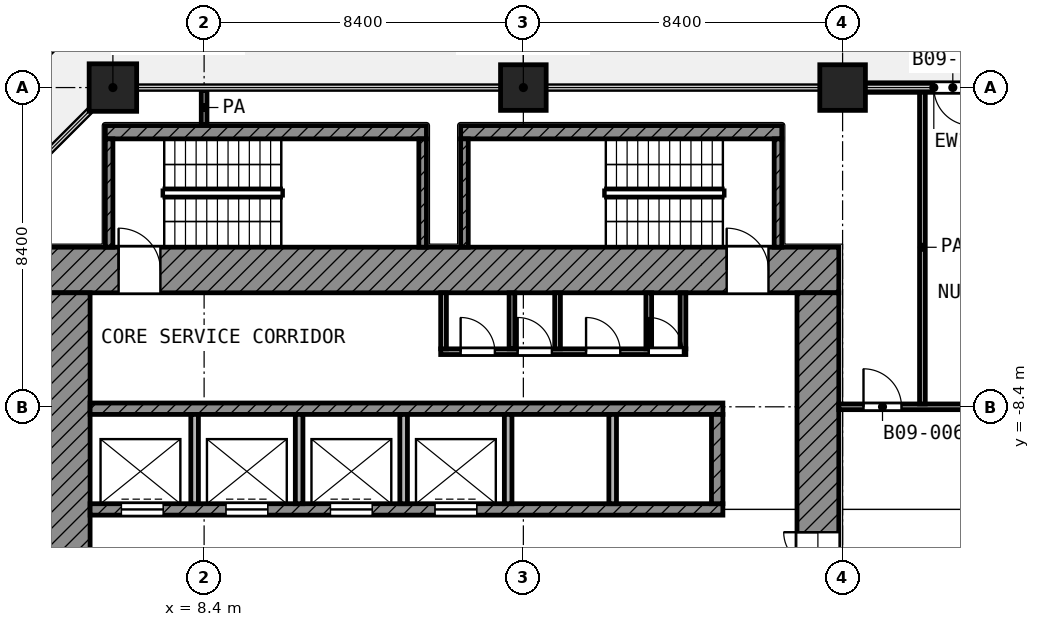
"""IFC4 building model, lengths in metres.
Left out: names, types, materials, properties, quantities, classifications, styles, units other than length and angle.
Written with IfcOpenShell. Run it as: python <this file> out.ifc"""

import sys

from ifc_helpers import new_model, si_unit, direction, frame, frame_2d, origin, origin_2d, place, context, subcontext, project, spatial, rectangle, extrude, element, fill, save


model = new_model("IFC4")
c1 = context("Model", 3, precision=1e-05, world=origin(), true_north=direction((0.0, 1.0)))
c2 = subcontext(c1, "Body", "Model", "MODEL_VIEW")
j1 = project(units=[si_unit("LENGTHUNIT", "METRE"), si_unit("PLANEANGLEUNIT", "RADIAN")], contexts=[c1])
p1 = place(None, origin())
s1 = spatial("IfcSite", under=j1, at=p1, CompositionType="ELEMENT")
p2 = place(p1, origin())
s2 = spatial("IfcBuilding", under=s1, at=p2, CompositionType="ELEMENT")
p3 = place(p2, frame((0.0, 0.0, 43.4)))
s3 = spatial("IfcBuildingStorey", under=s2, at=p3, CompositionType="ELEMENT", Elevation=43.4)
p4 = place(p3, frame((6.0, 0.0, 0.0), z_axis=(0.0, 0.0, 1.0), x_axis=(1.0, 0.0, 0.0)))
e1 = element("IfcColumn", 1, at=p4, inside=s3, PredefinedType="COLUMN", context=c2, shape_type="SweptSolid", body=[
    extrude(rectangle(XDim=1.25, YDim=1.25, at=origin_2d()), origin(), (0.0, 0.0, 1.0), 4.2),
])
for number, where, z_axis, x_axis in (
    (2, (16.8, 0.0, 0.0), (0.0, 0.0, 1.0), (1.0, 0.0, 0.0)),
    (3, (25.2, 0.0, 0.0), (0.0, 0.0, 1.0), (1.0, 0.0, 0.0)),
):
    element("IfcColumn", number, at=place(p3, frame(where, z_axis=z_axis, x_axis=x_axis)), inside=s3, PredefinedType="COLUMN", context=c2, shape_type="SweptSolid", body=[
        extrude(rectangle(XDim=1.2, YDim=1.2, at=origin_2d()), origin(), (0.0, 0.0, 1.0), 4.2),
    ])
p5 = place(p3, frame((29.4, 0.0, 0.0), z_axis=(0.0, 0.0, 1.0), x_axis=(-1.0, 0.0, 0.0)))
e4 = element("IfcWall", 4, at=p5, inside=s3, PredefinedType="SOLIDWALL", context=c2, shape_type="SweptSolid", body=[
    extrude(rectangle(XDim=3.6, YDim=0.25, at=frame_2d((1.8, 0.0))), origin(), (0.0, 0.0, 1.0), 3.78),
])
p6 = place(p5, frame((0.8, 0.0, 0.0)))
e5 = element("IfcOpeningElement", 5, at=p6, cuts=e4, PredefinedType="OPENING", context=c2, shape_type="SweptSolid", body=[
    extrude(rectangle(XDim=1.0, YDim=2.1, at=frame_2d((0.5, 1.05))), frame((0.0, 0.135, 0.0), z_axis=(0.0, -1.0, 0.0), x_axis=(1.0, 0.0, 0.0)), (0.0, 0.0, 1.0), 0.27),
])
p7 = place(p3, frame((4.2, -4.8, 0.0), z_axis=(0.0, 0.0, 1.0), x_axis=(1.0, 0.0, 0.0)))
e6 = element("IfcWall", 6, at=p7, inside=s3, PredefinedType="SHEAR", context=c2, shape_type="SweptSolid", body=[
    extrude(rectangle(XDim=20.9, YDim=1.2, at=frame_2d((10.45, 0.0))), origin(), (0.0, 0.0, 1.0), 3.9),
])
p8 = place(p7, frame((1.95, 0.0, 0.0)))
e7 = element("IfcOpeningElement", 7, at=p8, cuts=e6, PredefinedType="OPENING", context=c2, shape_type="SweptSolid", body=[
    extrude(rectangle(XDim=1.1, YDim=2.1, at=frame_2d((0.55, 1.05))), frame((0.0, 0.61, 0.0), z_axis=(0.0, -1.0, 0.0), x_axis=(1.0, 0.0, 0.0)), (0.0, 0.0, 1.0), 1.22),
])
p9 = place(p7, frame((17.95, 0.0, 0.0)))
e8 = element("IfcOpeningElement", 8, at=p9, cuts=e6, PredefinedType="OPENING", context=c2, shape_type="SweptSolid", body=[
    extrude(rectangle(XDim=1.1, YDim=2.1, at=frame_2d((0.55, 1.05))), frame((0.0, 0.61, 0.0), z_axis=(0.0, -1.0, 0.0), x_axis=(1.0, 0.0, 0.0)), (0.0, 0.0, 1.0), 1.22),
])
p10 = place(p3, frame((4.8, -25.1, 0.0), z_axis=(0.0, 0.0, 1.0), x_axis=(0.0, 1.0, 0.0)))
e9 = element("IfcWall", 9, at=p10, inside=s3, PredefinedType="SHEAR", context=c2, shape_type="SweptSolid", body=[
    extrude(rectangle(XDim=19.7, YDim=1.2, at=frame_2d((9.85, 0.0))), origin(), (0.0, 0.0, 1.0), 3.9),
])
p11 = place(p10, frame((11.55, 0.0, 0.0)))
e10 = element("IfcOpeningElement", 10, at=p11, cuts=e9, PredefinedType="OPENING", context=c2, shape_type="SweptSolid", body=[
    extrude(rectangle(XDim=1.1, YDim=2.1, at=frame_2d((0.55, 1.05))), frame((0.0, 0.61, 0.0), z_axis=(0.0, -1.0, 0.0), x_axis=(1.0, 0.0, 0.0)), (0.0, 0.0, 1.0), 1.22),
])
p12 = place(p10, frame((2.25, 0.0, 0.0)))
e11 = element("IfcOpeningElement", 11, at=p12, cuts=e9, PredefinedType="OPENING", context=c2, shape_type="SweptSolid", body=[
    extrude(rectangle(XDim=1.1, YDim=2.1, at=frame_2d((0.55, 1.05))), frame((0.0, 0.61, 0.0), z_axis=(0.0, -1.0, 0.0), x_axis=(1.0, 0.0, 0.0)), (0.0, 0.0, 1.0), 1.22),
])
p13 = place(p3, frame((24.55, -24.0, 0.0), z_axis=(0.0, 0.0, 1.0), x_axis=(0.0, 1.0, 0.0)))
e12 = element("IfcWall", 12, at=p13, inside=s3, PredefinedType="SHEAR", context=c2, shape_type="SweptSolid", body=[
    extrude(rectangle(XDim=18.6, YDim=1.1, at=frame_2d((9.3, 0.0))), origin(), (0.0, 0.0, 1.0), 3.9),
])
p14 = place(p13, frame((10.5, 0.0, 0.0)))
e13 = element("IfcOpeningElement", 13, at=p14, cuts=e12, PredefinedType="OPENING", context=c2, shape_type="SweptSolid", body=[
    extrude(rectangle(XDim=1.8, YDim=2.1, at=frame_2d((0.9, 1.05))), frame((0.0, 0.56, 0.0), z_axis=(0.0, -1.0, 0.0), x_axis=(1.0, 0.0, 0.0)), (0.0, 0.0, 1.0), 1.12),
])
p15 = place(p3, frame((5.4, -8.45, 0.0), z_axis=(0.0, 0.0, 1.0), x_axis=(1.0, 0.0, 0.0)))
e14 = element("IfcWall", 14, at=p15, inside=s3, PredefinedType="SHEAR", context=c2, shape_type="SweptSolid", body=[
    extrude(rectangle(XDim=16.65, YDim=0.3, at=frame_2d((8.325, 0.0))), origin(), (0.0, 0.0, 1.0), 3.9),
])
p16 = place(p3, frame((5.4, -11.1, 0.0), z_axis=(0.0, 0.0, 1.0), x_axis=(1.0, 0.0, 0.0)))
e15 = element("IfcWall", 15, at=p16, inside=s3, PredefinedType="SHEAR", context=c2, shape_type="SweptSolid", body=[
    extrude(rectangle(XDim=16.65, YDim=0.3, at=frame_2d((8.325, 0.0))), origin(), (0.0, 0.0, 1.0), 3.9),
])
p17 = place(p16, frame((0.825, 0.0, 0.0)))
e16 = element("IfcOpeningElement", 16, at=p17, cuts=e15, PredefinedType="OPENING", context=c2, shape_type="SweptSolid", body=[
    extrude(rectangle(XDim=1.1, YDim=2.1, at=frame_2d((0.55, 1.05))), frame((0.0, 0.16, 0.0), z_axis=(0.0, -1.0, 0.0), x_axis=(1.0, 0.0, 0.0)), (0.0, 0.0, 1.0), 0.32),
])
p18 = place(p16, frame((3.575, 0.0, 0.0)))
e17 = element("IfcOpeningElement", 17, at=p18, cuts=e15, PredefinedType="OPENING", context=c2, shape_type="SweptSolid", body=[
    extrude(rectangle(XDim=1.1, YDim=2.1, at=frame_2d((0.55, 1.05))), frame((0.0, 0.16, 0.0), z_axis=(0.0, -1.0, 0.0), x_axis=(1.0, 0.0, 0.0)), (0.0, 0.0, 1.0), 0.32),
])
p19 = place(p16, frame((6.325, 0.0, 0.0)))
e18 = element("IfcOpeningElement", 18, at=p19, cuts=e15, PredefinedType="OPENING", context=c2, shape_type="SweptSolid", body=[
    extrude(rectangle(XDim=1.1, YDim=2.1, at=frame_2d((0.55, 1.05))), frame((0.0, 0.16, 0.0), z_axis=(0.0, -1.0, 0.0), x_axis=(1.0, 0.0, 0.0)), (0.0, 0.0, 1.0), 0.32),
])
p20 = place(p16, frame((9.075, 0.0, 0.0)))
e19 = element("IfcOpeningElement", 19, at=p20, cuts=e15, PredefinedType="OPENING", context=c2, shape_type="SweptSolid", body=[
    extrude(rectangle(XDim=1.1, YDim=2.1, at=frame_2d((0.55, 1.05))), frame((0.0, 0.16, 0.0), z_axis=(0.0, -1.0, 0.0), x_axis=(1.0, 0.0, 0.0)), (0.0, 0.0, 1.0), 0.32),
])
p21 = place(p3, frame((21.9, -10.95, 0.0), z_axis=(0.0, 0.0, 1.0), x_axis=(0.0, 1.0, 0.0)))
e20 = element("IfcWall", 20, at=p21, inside=s3, PredefinedType="SHEAR", context=c2, shape_type="SweptSolid", body=[
    extrude(rectangle(XDim=2.35, YDim=0.3, at=frame_2d((1.175, 0.0))), origin(), (0.0, 0.0, 1.0), 3.9),
])
for number, where, z_axis, x_axis in (
    (21, (8.15, -10.95, 0.0), (0.0, 0.0, 1.0), (0.0, 1.0, 0.0)),
    (22, (10.9, -10.95, 0.0), (0.0, 0.0, 1.0), (0.0, 1.0, 0.0)),
    (23, (13.65, -10.95, 0.0), (0.0, 0.0, 1.0), (0.0, 1.0, 0.0)),
    (24, (16.4, -10.95, 0.0), (0.0, 0.0, 1.0), (0.0, 1.0, 0.0)),
    (25, (19.15, -10.95, 0.0), (0.0, 0.0, 1.0), (0.0, 1.0, 0.0)),
):
    element("IfcWall", number, at=place(p3, frame(where, z_axis=z_axis, x_axis=x_axis)), inside=s3, PredefinedType="PARTITIONING", context=c2, shape_type="SweptSolid", body=[
        extrude(rectangle(XDim=2.35, YDim=0.2, at=frame_2d((1.175, 0.0))), origin(), (0.0, 0.0, 1.0), 3.9),
    ])
p22 = place(p3, frame((14.625, -6.95, 0.0), z_axis=(0.0, 0.0, 1.0), x_axis=(1.0, 0.0, 0.0)))
e26 = element("IfcWall", 26, at=p22, inside=s3, PredefinedType="PARTITIONING", context=c2, shape_type="SweptSolid", body=[
    extrude(rectangle(XDim=6.45, YDim=0.15, at=frame_2d((3.225, 0.0))), origin(), (0.0, 0.0, 1.0), 3.9),
])
p23 = place(p22, frame((0.525, 0.0, 0.0)))
e27 = element("IfcOpeningElement", 27, at=p23, cuts=e26, PredefinedType="OPENING", context=c2, shape_type="SweptSolid", body=[
    extrude(rectangle(XDim=0.9, YDim=2.1, at=frame_2d((0.45, 1.05))), frame((0.0, 0.085, 0.0), z_axis=(0.0, -1.0, 0.0), x_axis=(1.0, 0.0, 0.0)), (0.0, 0.0, 1.0), 0.17),
])
p24 = place(p22, frame((2.025, 0.0, 0.0)))
e28 = element("IfcOpeningElement", 28, at=p24, cuts=e26, PredefinedType="OPENING", context=c2, shape_type="SweptSolid", body=[
    extrude(rectangle(XDim=0.9, YDim=2.1, at=frame_2d((0.45, 1.05))), frame((0.0, 0.085, 0.0), z_axis=(0.0, -1.0, 0.0), x_axis=(1.0, 0.0, 0.0)), (0.0, 0.0, 1.0), 0.17),
])
p25 = place(p22, frame((3.825, 0.0, 0.0)))
e29 = element("IfcOpeningElement", 29, at=p25, cuts=e26, PredefinedType="OPENING", context=c2, shape_type="SweptSolid", body=[
    extrude(rectangle(XDim=0.9, YDim=2.1, at=frame_2d((0.45, 1.05))), frame((0.0, 0.085, 0.0), z_axis=(0.0, -1.0, 0.0), x_axis=(1.0, 0.0, 0.0)), (0.0, 0.0, 1.0), 0.17),
])
p26 = place(p22, frame((5.475, 0.0, 0.0)))
e30 = element("IfcOpeningElement", 30, at=p26, cuts=e26, PredefinedType="OPENING", context=c2, shape_type="SweptSolid", body=[
    extrude(rectangle(XDim=0.9, YDim=2.1, at=frame_2d((0.45, 1.05))), frame((0.0, 0.085, 0.0), z_axis=(0.0, -1.0, 0.0), x_axis=(1.0, 0.0, 0.0)), (0.0, 0.0, 1.0), 0.17),
])
for number, where, z_axis, x_axis in (
    (31, (14.7, -6.875, 0.0), (0.0, 0.0, 1.0), (0.0, 1.0, 0.0)),
    (32, (16.5, -6.875, 0.0), (0.0, 0.0, 1.0), (0.0, 1.0, 0.0)),
    (33, (17.7, -6.875, 0.0), (0.0, 0.0, 1.0), (0.0, 1.0, 0.0)),
    (34, (20.1, -6.875, 0.0), (0.0, 0.0, 1.0), (0.0, 1.0, 0.0)),
    (35, (21.0, -6.875, 0.0), (0.0, 0.0, 1.0), (0.0, 1.0, 0.0)),
):
    element("IfcWall", number, at=place(p3, frame(where, z_axis=z_axis, x_axis=x_axis)), inside=s3, PredefinedType="PARTITIONING", context=c2, shape_type="SweptSolid", body=[
        extrude(rectangle(XDim=1.475, YDim=0.15, at=frame_2d((0.738, 0.0))), origin(), (0.0, 0.0, 1.0), 3.9),
    ])
p27 = place(p3, frame((5.8, -1.175, 0.0), z_axis=(0.0, 0.0, 1.0), x_axis=(1.0, 0.0, 0.0)))
e36 = element("IfcWall", 36, at=p27, inside=s3, PredefinedType="SHEAR", context=c2, shape_type="SweptSolid", body=[
    extrude(rectangle(XDim=8.45, YDim=0.35, at=frame_2d((4.225, 0.0))), origin(), (0.0, 0.0, 1.0), 3.9),
])
for number, where, z_axis, x_axis in (
    (37, (5.9, -4.2, 0.0), (0.0, 0.0, 1.0), (0.0, 1.0, 0.0)),
    (38, (14.15, -4.2, 0.0), (0.0, 0.0, 1.0), (0.0, 1.0, 0.0)),
):
    element("IfcWall", number, at=place(p3, frame(where, z_axis=z_axis, x_axis=x_axis)), inside=s3, PredefinedType="SHEAR", context=c2, shape_type="SweptSolid", body=[
        extrude(rectangle(XDim=2.85, YDim=0.2, at=frame_2d((1.425, 0.0))), origin(), (0.0, 0.0, 1.0), 3.9),
    ])
p28 = place(p3, frame((15.15, -1.175, 0.0), z_axis=(0.0, 0.0, 1.0), x_axis=(1.0, 0.0, 0.0)))
e39 = element("IfcWall", 39, at=p28, inside=s3, PredefinedType="SHEAR", context=c2, shape_type="SweptSolid", body=[
    extrude(rectangle(XDim=8.45, YDim=0.35, at=frame_2d((4.225, 0.0))), origin(), (0.0, 0.0, 1.0), 3.9),
])
for number, where, z_axis, x_axis in (
    (40, (15.25, -4.2, 0.0), (0.0, 0.0, 1.0), (0.0, 1.0, 0.0)),
    (41, (23.5, -4.2, 0.0), (0.0, 0.0, 1.0), (0.0, 1.0, 0.0)),
):
    element("IfcWall", number, at=place(p3, frame(where, z_axis=z_axis, x_axis=x_axis)), inside=s3, PredefinedType="SHEAR", context=c2, shape_type="SweptSolid", body=[
        extrude(rectangle(XDim=2.85, YDim=0.2, at=frame_2d((1.425, 0.0))), origin(), (0.0, 0.0, 1.0), 3.9),
    ])
p29 = place(p3, frame((25.1, -8.4, 0.0), z_axis=(0.0, 0.0, 1.0), x_axis=(1.0, 0.0, 0.0)))
e42 = element("IfcWall", 42, at=p29, inside=s3, PredefinedType="PARTITIONING", context=c2, shape_type="SweptSolid", body=[
    extrude(rectangle(XDim=14.932, YDim=0.15, at=frame_2d((7.466, 0.0))), origin(), (0.0, 0.0, 1.0), 3.9),
])
p30 = place(p29, frame((0.65, 0.0, 0.0)))
e43 = element("IfcOpeningElement", 43, at=p30, cuts=e42, PredefinedType="OPENING", context=c2, shape_type="SweptSolid", body=[
    extrude(rectangle(XDim=1.0, YDim=2.1, at=frame_2d((0.5, 1.05))), frame((0.0, 0.085, 0.0), z_axis=(0.0, -1.0, 0.0), x_axis=(1.0, 0.0, 0.0)), (0.0, 0.0, 1.0), 0.17),
])
p31 = place(p29, frame((4.75, 0.0, 0.0)))
e44 = element("IfcOpeningElement", 44, at=p31, cuts=e42, PredefinedType="OPENING", context=c2, shape_type="SweptSolid", body=[
    extrude(rectangle(XDim=1.2, YDim=2.1, at=frame_2d((0.6, 1.05))), frame((0.0, 0.085, 0.0), z_axis=(0.0, -1.0, 0.0), x_axis=(1.0, 0.0, 0.0)), (0.0, 0.0, 1.0), 0.17),
])
p32 = place(p3, frame((8.4, -0.97, 0.0), z_axis=(0.0, 0.0, 1.0), x_axis=(0.0, 1.0, 0.0)))
e45 = element("IfcWall", 45, at=p32, inside=s3, PredefinedType="PARTITIONING", context=c2, shape_type="SweptSolid", body=[
    extrude(rectangle(XDim=0.89, YDim=0.15, at=frame_2d((0.445, 0.0))), origin(), (0.0, 0.0, 1.0), 3.9),
])
p33 = place(p3, frame((27.3, -8.325, 0.0), z_axis=(0.0, 0.0, 1.0), x_axis=(0.0, 1.0, 0.0)))
e46 = element("IfcWall", 46, at=p33, inside=s3, PredefinedType="PARTITIONING", context=c2, shape_type="SweptSolid", body=[
    extrude(rectangle(XDim=8.245, YDim=0.15, at=frame_2d((4.123, 0.0))), origin(), (0.0, 0.0, 1.0), 3.9),
])
p34 = place(p6, origin())
e47 = element("IfcDoor", 47, at=p34, inside=s3, OperationType="SINGLE_SWING_LEFT", PredefinedType="DOOR", context=c2, shape_type="SweptSolid", body=[
    extrude(rectangle(XDim=1.0, YDim=2.1, at=frame_2d((0.5, 1.05))), frame((0.0, 0.025, 0.0), z_axis=(0.0, -1.0, 0.0), x_axis=(1.0, 0.0, 0.0)), (0.0, 0.0, 1.0), 0.05),
])
fill(e5, e47)
p35 = place(p17, origin())
e48 = element("IfcDoor", 48, at=p35, inside=s3, OperationType="DOUBLE_DOOR_SLIDING", PredefinedType="DOOR", context=c2, shape_type="SweptSolid", body=[
    extrude(rectangle(XDim=1.1, YDim=2.1, at=frame_2d((0.55, 1.05))), frame((0.0, 0.025, 0.0), z_axis=(0.0, -1.0, 0.0), x_axis=(1.0, 0.0, 0.0)), (0.0, 0.0, 1.0), 0.05),
])
fill(e16, e48)
p36 = place(p18, origin())
e49 = element("IfcDoor", 49, at=p36, inside=s3, OperationType="DOUBLE_DOOR_SLIDING", PredefinedType="DOOR", context=c2, shape_type="SweptSolid", body=[
    extrude(rectangle(XDim=1.1, YDim=2.1, at=frame_2d((0.55, 1.05))), frame((0.0, 0.025, 0.0), z_axis=(0.0, -1.0, 0.0), x_axis=(1.0, 0.0, 0.0)), (0.0, 0.0, 1.0), 0.05),
])
fill(e17, e49)
p37 = place(p19, origin())
e50 = element("IfcDoor", 50, at=p37, inside=s3, OperationType="DOUBLE_DOOR_SLIDING", PredefinedType="DOOR", context=c2, shape_type="SweptSolid", body=[
    extrude(rectangle(XDim=1.1, YDim=2.1, at=frame_2d((0.55, 1.05))), frame((0.0, 0.025, 0.0), z_axis=(0.0, -1.0, 0.0), x_axis=(1.0, 0.0, 0.0)), (0.0, 0.0, 1.0), 0.05),
])
fill(e18, e50)
p38 = place(p20, origin())
e51 = element("IfcDoor", 51, at=p38, inside=s3, OperationType="DOUBLE_DOOR_SLIDING", PredefinedType="DOOR", context=c2, shape_type="SweptSolid", body=[
    extrude(rectangle(XDim=1.1, YDim=2.1, at=frame_2d((0.55, 1.05))), frame((0.0, 0.025, 0.0), z_axis=(0.0, -1.0, 0.0), x_axis=(1.0, 0.0, 0.0)), (0.0, 0.0, 1.0), 0.05),
])
fill(e19, e51)
p39 = place(p8, origin())
e52 = element("IfcDoor", 52, at=p39, inside=s3, OperationType="SINGLE_SWING_LEFT", PredefinedType="DOOR", context=c2, shape_type="SweptSolid", body=[
    extrude(rectangle(XDim=1.1, YDim=2.1, at=frame_2d((0.55, 1.05))), frame((0.0, 0.025, 0.0), z_axis=(0.0, -1.0, 0.0), x_axis=(1.0, 0.0, 0.0)), (0.0, 0.0, 1.0), 0.05),
])
fill(e7, e52)
p40 = place(p9, origin())
e53 = element("IfcDoor", 53, at=p40, inside=s3, OperationType="SINGLE_SWING_LEFT", PredefinedType="DOOR", context=c2, shape_type="SweptSolid", body=[
    extrude(rectangle(XDim=1.1, YDim=2.1, at=frame_2d((0.55, 1.05))), frame((0.0, 0.025, 0.0), z_axis=(0.0, -1.0, 0.0), x_axis=(1.0, 0.0, 0.0)), (0.0, 0.0, 1.0), 0.05),
])
fill(e8, e53)
p41 = place(p14, origin())
e54 = element("IfcDoor", 54, at=p41, inside=s3, OperationType="DOUBLE_DOOR_SINGLE_SWING", PredefinedType="DOOR", context=c2, shape_type="SweptSolid", body=[
    extrude(rectangle(XDim=1.8, YDim=2.1, at=frame_2d((0.9, 1.05))), frame((0.0, 0.025, 0.0), z_axis=(0.0, -1.0, 0.0), x_axis=(1.0, 0.0, 0.0)), (0.0, 0.0, 1.0), 0.05),
])
fill(e13, e54)
p42 = place(p23, origin())
e55 = element("IfcDoor", 55, at=p42, inside=s3, OperationType="SINGLE_SWING_LEFT", PredefinedType="DOOR", context=c2, shape_type="SweptSolid", body=[
    extrude(rectangle(XDim=0.9, YDim=2.1, at=frame_2d((0.45, 1.05))), frame((0.0, 0.025, 0.0), z_axis=(0.0, -1.0, 0.0), x_axis=(1.0, 0.0, 0.0)), (0.0, 0.0, 1.0), 0.05),
])
fill(e27, e55)
p43 = place(p24, origin())
e56 = element("IfcDoor", 56, at=p43, inside=s3, OperationType="SINGLE_SWING_LEFT", PredefinedType="DOOR", context=c2, shape_type="SweptSolid", body=[
    extrude(rectangle(XDim=0.9, YDim=2.1, at=frame_2d((0.45, 1.05))), frame((0.0, 0.025, 0.0), z_axis=(0.0, -1.0, 0.0), x_axis=(1.0, 0.0, 0.0)), (0.0, 0.0, 1.0), 0.05),
])
fill(e28, e56)
p44 = place(p25, origin())
e57 = element("IfcDoor", 57, at=p44, inside=s3, OperationType="SINGLE_SWING_LEFT", PredefinedType="DOOR", context=c2, shape_type="SweptSolid", body=[
    extrude(rectangle(XDim=0.9, YDim=2.1, at=frame_2d((0.45, 1.05))), frame((0.0, 0.025, 0.0), z_axis=(0.0, -1.0, 0.0), x_axis=(1.0, 0.0, 0.0)), (0.0, 0.0, 1.0), 0.05),
])
fill(e29, e57)
p45 = place(p26, origin())
e58 = element("IfcDoor", 58, at=p45, inside=s3, OperationType="SINGLE_SWING_LEFT", PredefinedType="DOOR", context=c2, shape_type="SweptSolid", body=[
    extrude(rectangle(XDim=0.9, YDim=2.1, at=frame_2d((0.45, 1.05))), frame((0.0, 0.025, 0.0), z_axis=(0.0, -1.0, 0.0), x_axis=(1.0, 0.0, 0.0)), (0.0, 0.0, 1.0), 0.05),
])
fill(e30, e58)
p46 = place(p30, origin())
e59 = element("IfcDoor", 59, at=p46, inside=s3, OperationType="SINGLE_SWING_LEFT", PredefinedType="DOOR", context=c2, shape_type="SweptSolid", body=[
    extrude(rectangle(XDim=1.0, YDim=2.1, at=frame_2d((0.5, 1.05))), frame((0.0, 0.025, 0.0), z_axis=(0.0, -1.0, 0.0), x_axis=(1.0, 0.0, 0.0)), (0.0, 0.0, 1.0), 0.05),
])
fill(e43, e59)
save(model, sys.argv[1])
